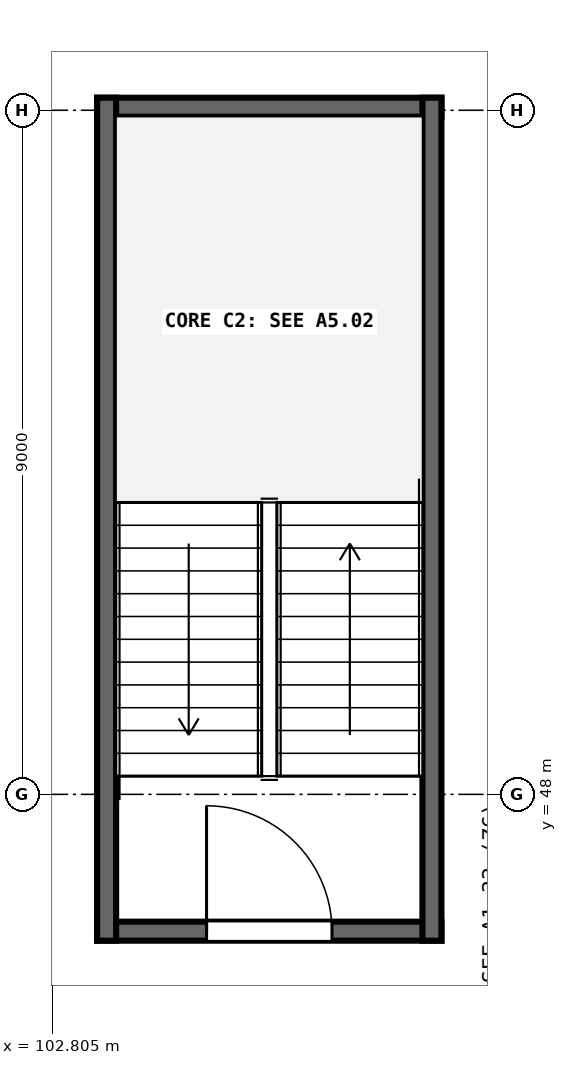
"""IFC4 building model, lengths in metres.
Left out: names, types, materials, properties, quantities, classifications, styles, units other than length and angle.
Written with IfcOpenShell. Run it as: python <this file> out.ifc"""

import sys

from ifc_helpers import new_model, si_unit, direction, frame, frame_2d, origin, place, context, subcontext, project, spatial, rectangle, extrude, element, fill, save


model = new_model("IFC4")
c1 = context("Model", 3, precision=1e-05, world=origin(), true_north=direction((0.0, 1.0)))
c2 = subcontext(c1, "Body", "Model", "MODEL_VIEW")
j1 = project(units=[si_unit("LENGTHUNIT", "METRE"), si_unit("PLANEANGLEUNIT", "RADIAN")], contexts=[c1])
p1 = place(None, origin())
s1 = spatial("IfcSite", under=j1, at=p1, CompositionType="ELEMENT")
p2 = place(p1, origin())
s2 = spatial("IfcBuilding", under=s1, at=p2, CompositionType="ELEMENT")
p3 = place(p2, frame((0.0, 0.0, 10.2)))
s3 = spatial("IfcBuildingStorey", under=s2, at=p3, CompositionType="ELEMENT", Elevation=10.2)
p4 = place(p3, frame((103.395, 46.2, 0.0), z_axis=(0.0, 0.0, 1.0), x_axis=(1.0, 0.0, 0.0)))
e1 = element("IfcWall", 1, at=p4, inside=s3, PredefinedType="SHEAR", context=c2, shape_type="SweptSolid", body=[
    extrude(rectangle(XDim=4.53, YDim=0.25, at=frame_2d((2.265, 0.0))), origin(), (0.0, 0.0, 1.0), 4.24),
])
p5 = place(p4, frame((1.44, 0.0, 0.0)))
e2 = element("IfcOpeningElement", 2, at=p5, cuts=e1, PredefinedType="OPENING", context=c2, shape_type="SweptSolid", body=[
    extrude(rectangle(XDim=1.65, YDim=2.22, at=frame_2d((0.825, 1.11))), frame((0.0, 0.135, 0.0), z_axis=(0.0, -1.0, 0.0), x_axis=(1.0, 0.0, 0.0)), (0.0, 0.0, 1.0), 0.27),
])
p6 = place(p3, frame((103.395, 57.04, 0.0), z_axis=(0.0, 0.0, 1.0), x_axis=(1.0, 0.0, 0.0)))
e3 = element("IfcWall", 3, at=p6, inside=s3, PredefinedType="SHEAR", context=c2, shape_type="SweptSolid", body=[
    extrude(rectangle(XDim=4.53, YDim=0.25, at=frame_2d((2.265, 0.0))), origin(), (0.0, 0.0, 1.0), 4.24),
])
for number, where, z_axis, x_axis in (
    (4, (103.52, 46.075, 0.0), (0.0, 0.0, 1.0), (0.0, 1.0, 0.0)),
    (5, (107.8, 46.075, 0.0), (0.0, 0.0, 1.0), (0.0, 1.0, 0.0)),
):
    element("IfcWall", number, at=place(p3, frame(where, z_axis=z_axis, x_axis=x_axis)), inside=s3, PredefinedType="SHEAR", context=c2, shape_type="SweptSolid", body=[
        extrude(rectangle(XDim=11.09, YDim=0.25, at=frame_2d((5.545, 0.0))), origin(), (0.0, 0.0, 1.0), 4.24),
    ])
p7 = place(p5, origin())
e6 = element("IfcDoor", 6, at=p7, inside=s3, OperationType="SINGLE_SWING_LEFT", PredefinedType="DOOR", context=c2, shape_type="SweptSolid", body=[
    extrude(rectangle(XDim=1.65, YDim=2.22, at=frame_2d((0.825, 1.11))), frame((0.0, 0.025, 0.0), z_axis=(0.0, -1.0, 0.0), x_axis=(1.0, 0.0, 0.0)), (0.0, 0.0, 1.0), 0.05),
])
fill(e2, e6)
save(model, sys.argv[1])
